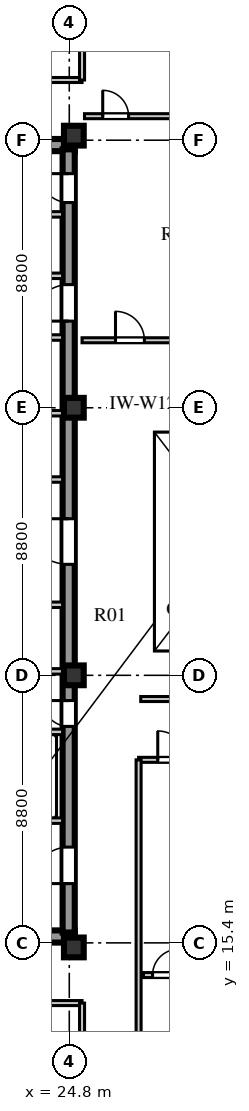
"""IFC4 building model, lengths in metres.
Left out: names, types, materials, properties, quantities, classifications, styles, units other than length and angle.
Written with IfcOpenShell. Run it as: python <this file> out.ifc"""

import sys

from ifc_helpers import new_model, si_unit, direction, frame, frame_2d, origin, origin_2d, place, context, subcontext, project, spatial, rectangle, extrude, element, fill, save


model = new_model("IFC4")
c1 = context("Model", 3, precision=1e-05, world=origin(), true_north=direction((0.0, 1.0)))
c2 = subcontext(c1, "Body", "Model", "MODEL_VIEW")
j1 = project(units=[si_unit("LENGTHUNIT", "METRE"), si_unit("PLANEANGLEUNIT", "RADIAN")], contexts=[c1])
p1 = place(None, origin())
s1 = spatial("IfcSite", under=j1, at=p1, CompositionType="ELEMENT")
p2 = place(p1, origin())
s2 = spatial("IfcBuilding", under=s1, at=p2, CompositionType="ELEMENT")
p3 = place(p2, frame((0.0, 0.0, 253.1)))
s3 = spatial("IfcBuildingStorey", under=s2, at=p3, CompositionType="ELEMENT", Elevation=253.1)
for number, where, z_axis, x_axis in (
    (1, (15.5, 15.61, 0.0), (0.0, 0.0, 1.0), (1.0, 0.0, 0.0)),
    (2, (15.5, 41.64, 0.0), (0.0, 0.0, 1.0), (1.0, 0.0, 0.0)),
):
    element("IfcWall", number, at=place(p3, frame(where, z_axis=z_axis, x_axis=x_axis)), inside=s3, PredefinedType="SHEAR", context=c2, shape_type="SweptSolid", body=[
        extrude(rectangle(XDim=9.48, YDim=0.4, at=frame_2d((4.74, 0.0))), origin(), (0.0, 0.0, 1.0), 3.66),
    ])
p4 = place(p3, frame((24.78, 15.74, 0.0), z_axis=(0.0, 0.0, 1.0), x_axis=(0.0, 1.0, 0.0)))
e3 = element("IfcWall", 3, at=p4, inside=s3, PredefinedType="SHEAR", context=c2, shape_type="SweptSolid", body=[
    extrude(rectangle(XDim=25.76, YDim=0.4, at=frame_2d((12.88, 0.0))), origin(), (0.0, 0.0, 1.0), 3.66),
])
p5 = place(p4, frame((1.61, 0.0, 0.0)))
e4 = element("IfcOpeningElement", 4, at=p5, cuts=e3, PredefinedType="OPENING", context=c2, shape_type="SweptSolid", body=[
    extrude(rectangle(XDim=1.2, YDim=2.1, at=frame_2d((0.6, 1.05))), frame((0.0, 0.21, 0.0), z_axis=(0.0, -1.0, 0.0), x_axis=(1.0, 0.0, 0.0)), (0.0, 0.0, 1.0), 0.42),
])
p6 = place(p4, frame((6.78, 0.0, 0.0)))
e5 = element("IfcOpeningElement", 5, at=p6, cuts=e3, PredefinedType="OPENING", context=c2, shape_type="SweptSolid", body=[
    extrude(rectangle(XDim=0.85, YDim=2.06, at=frame_2d((0.425, 1.03))), frame((0.0, 0.21, 0.0), z_axis=(0.0, -1.0, 0.0), x_axis=(1.0, 0.0, 0.0)), (0.0, 0.0, 1.0), 0.42),
])
p7 = place(p4, frame((12.11, 0.0, 0.0)))
e6 = element("IfcOpeningElement", 6, at=p7, cuts=e3, PredefinedType="OPENING", context=c2, shape_type="SweptSolid", body=[
    extrude(rectangle(XDim=1.5, YDim=2.12, at=frame_2d((0.75, 1.06))), frame((0.0, 0.21, 0.0), z_axis=(0.0, -1.0, 0.0), x_axis=(1.0, 0.0, 0.0)), (0.0, 0.0, 1.0), 0.42),
])
p8 = place(p4, frame((20.11, 0.0, 0.0)))
e7 = element("IfcOpeningElement", 7, at=p8, cuts=e3, PredefinedType="OPENING", context=c2, shape_type="SweptSolid", body=[
    extrude(rectangle(XDim=1.2, YDim=2.12, at=frame_2d((0.6, 1.06))), frame((0.0, 0.21, 0.0), z_axis=(0.0, -1.0, 0.0), x_axis=(1.0, 0.0, 0.0)), (0.0, 0.0, 1.0), 0.42),
])
p9 = place(p4, frame((24.01, 0.0, 0.0)))
e8 = element("IfcOpeningElement", 8, at=p9, cuts=e3, PredefinedType="OPENING", context=c2, shape_type="SweptSolid", body=[
    extrude(rectangle(XDim=0.95, YDim=2.1, at=frame_2d((0.475, 1.05))), frame((0.0, 0.21, 0.0), z_axis=(0.0, -1.0, 0.0), x_axis=(1.0, 0.0, 0.0)), (0.0, 0.0, 1.0), 0.42),
])
for number, where, z_axis, x_axis in (
    (9, (24.95, 15.25, 0.0), (0.0, 0.0, 1.0), (1.0, 0.0, 0.0)),
    (10, (24.95, 24.2, 0.0), (0.0, 0.0, 1.0), (1.0, 0.0, 0.0)),
    (11, (24.95, 33.0, 0.0), (0.0, 0.0, 1.0), (1.0, 0.0, 0.0)),
    (12, (24.95, 41.95, 0.0), (0.0, 0.0, 1.0), (1.0, 0.0, 0.0)),
):
    element("IfcColumn", number, at=place(p3, frame(where, z_axis=z_axis, x_axis=x_axis)), inside=s3, PredefinedType="COLUMN", context=c2, shape_type="SweptSolid", body=[
        extrude(rectangle(XDim=0.65, YDim=0.65, at=origin_2d()), origin(), (0.0, 0.0, 1.0), 3.66),
    ])
p10 = place(p3, frame((19.64, 19.42, 0.0), z_axis=(0.0, 0.0, 1.0), x_axis=(1.0, 0.0, 0.0)))
e13 = element("IfcWall", 13, at=p10, inside=s3, PredefinedType="SOLIDWALL", context=c2, shape_type="SweptSolid", body=[
    extrude(rectangle(XDim=4.94, YDim=0.18, at=frame_2d((2.47, 0.0))), origin(), (0.0, 0.0, 1.0), 3.66),
])
p11 = place(p10, frame((0.72, 0.0, 0.0)))
e14 = element("IfcOpeningElement", 14, at=p11, cuts=e13, PredefinedType="OPENING", context=c2, shape_type="SweptSolid", body=[
    extrude(rectangle(XDim=1.1, YDim=2.1, at=frame_2d((0.55, 1.05))), frame((0.0, 0.1, 0.0), z_axis=(0.0, -1.0, 0.0), x_axis=(1.0, 0.0, 0.0)), (0.0, 0.0, 1.0), 0.2),
])
p12 = place(p10, frame((3.02, 0.0, 0.0)))
e15 = element("IfcOpeningElement", 15, at=p12, cuts=e13, PredefinedType="OPENING", context=c2, shape_type="SweptSolid", body=[
    extrude(rectangle(XDim=1.1, YDim=2.1, at=frame_2d((0.55, 1.05))), frame((0.0, 0.1, 0.0), z_axis=(0.0, -1.0, 0.0), x_axis=(1.0, 0.0, 0.0)), (0.0, 0.0, 1.0), 0.2),
])
p13 = place(p3, frame((19.64, 22.34, 0.0), z_axis=(0.0, 0.0, 1.0), x_axis=(1.0, 0.0, 0.0)))
e16 = element("IfcWall", 16, at=p13, inside=s3, PredefinedType="SOLIDWALL", context=c2, shape_type="SweptSolid", body=[
    extrude(rectangle(XDim=4.94, YDim=0.18, at=frame_2d((2.47, 0.0))), origin(), (0.0, 0.0, 1.0), 3.66),
])
p14 = place(p3, frame((15.9, 26.52, 0.0), z_axis=(0.0, 0.0, 1.0), x_axis=(1.0, 0.0, 0.0)))
e17 = element("IfcWall", 17, at=p14, inside=s3, PredefinedType="SOLIDWALL", context=c2, shape_type="SweptSolid", body=[
    extrude(rectangle(XDim=8.68, YDim=0.18, at=frame_2d((4.34, 0.0))), origin(), (0.0, 0.0, 1.0), 3.66),
])
p15 = place(p14, frame((2.05, 0.0, 0.0)))
e18 = element("IfcOpeningElement", 18, at=p15, cuts=e17, PredefinedType="OPENING", context=c2, shape_type="SweptSolid", body=[
    extrude(rectangle(XDim=0.85, YDim=2.06, at=frame_2d((0.425, 1.03))), frame((0.0, 0.1, 0.0), z_axis=(0.0, -1.0, 0.0), x_axis=(1.0, 0.0, 0.0)), (0.0, 0.0, 1.0), 0.2),
])
p16 = place(p14, frame((5.2, 0.0, 0.0)))
e19 = element("IfcOpeningElement", 19, at=p16, cuts=e17, PredefinedType="OPENING", context=c2, shape_type="SweptSolid", body=[
    extrude(rectangle(XDim=0.95, YDim=2.1, at=frame_2d((0.475, 1.05))), frame((0.0, 0.1, 0.0), z_axis=(0.0, -1.0, 0.0), x_axis=(1.0, 0.0, 0.0)), (0.0, 0.0, 1.0), 0.2),
])
p17 = place(p3, frame((15.9, 24.33, 0.0), z_axis=(0.0, 0.0, 1.0), x_axis=(1.0, 0.0, 0.0)))
e20 = element("IfcWall", 20, at=p17, inside=s3, PredefinedType="SOLIDWALL", context=c2, shape_type="SweptSolid", body=[
    extrude(rectangle(XDim=8.68, YDim=0.18, at=frame_2d((4.34, 0.0))), origin(), (0.0, 0.0, 1.0), 3.06),
])
p18 = place(p3, frame((15.9, 30.64, 0.0), z_axis=(0.0, 0.0, 1.0), x_axis=(1.0, 0.0, 0.0)))
e21 = element("IfcWall", 21, at=p18, inside=s3, PredefinedType="SOLIDWALL", context=c2, shape_type="SweptSolid", body=[
    extrude(rectangle(XDim=8.68, YDim=0.18, at=frame_2d((4.34, 0.0))), origin(), (0.0, 0.0, 1.0), 3.66),
])
p19 = place(p18, frame((3.7, 0.0, 0.0)))
e22 = element("IfcOpeningElement", 22, at=p19, cuts=e21, PredefinedType="OPENING", context=c2, shape_type="SweptSolid", body=[
    extrude(rectangle(XDim=0.95, YDim=2.1, at=frame_2d((0.475, 1.05))), frame((0.0, 0.1, 0.0), z_axis=(0.0, -1.0, 0.0), x_axis=(1.0, 0.0, 0.0)), (0.0, 0.0, 1.0), 0.2),
])
p20 = place(p3, frame((15.9, 32.82, 0.0), z_axis=(0.0, 0.0, 1.0), x_axis=(1.0, 0.0, 0.0)))
e23 = element("IfcWall", 23, at=p20, inside=s3, PredefinedType="SOLIDWALL", context=c2, shape_type="SweptSolid", body=[
    extrude(rectangle(XDim=8.68, YDim=0.18, at=frame_2d((4.34, 0.0))), origin(), (0.0, 0.0, 1.0), 3.06),
])
p21 = place(p3, frame((22.02, 35.31, 0.0), z_axis=(0.0, 0.0, 1.0), x_axis=(1.0, 0.0, 0.0)))
e24 = element("IfcWall", 24, at=p21, inside=s3, PredefinedType="SOLIDWALL", context=c2, shape_type="SweptSolid", body=[
    extrude(rectangle(XDim=2.56, YDim=0.18, at=frame_2d((1.28, 0.0))), origin(), (0.0, 0.0, 1.0), 3.66),
])
p22 = place(p21, frame((0.55, 0.0, 0.0)))
e25 = element("IfcOpeningElement", 25, at=p22, cuts=e24, PredefinedType="OPENING", context=c2, shape_type="SweptSolid", body=[
    extrude(rectangle(XDim=1.0, YDim=2.1, at=frame_2d((0.5, 1.05))), frame((0.0, 0.1, 0.0), z_axis=(0.0, -1.0, 0.0), x_axis=(1.0, 0.0, 0.0)), (0.0, 0.0, 1.0), 0.2),
])
p23 = place(p3, frame((19.64, 37.34, 0.0), z_axis=(0.0, 0.0, 1.0), x_axis=(1.0, 0.0, 0.0)))
e26 = element("IfcWall", 26, at=p23, inside=s3, PredefinedType="SOLIDWALL", context=c2, shape_type="SweptSolid", body=[
    extrude(rectangle(XDim=4.94, YDim=0.18, at=frame_2d((2.47, 0.0))), origin(), (0.0, 0.0, 1.0), 3.66),
])
p24 = place(p23, frame((0.45, 0.0, 0.0)))
e27 = element("IfcOpeningElement", 27, at=p24, cuts=e26, PredefinedType="OPENING", context=c2, shape_type="SweptSolid", body=[
    extrude(rectangle(XDim=1.0, YDim=2.1, at=frame_2d((0.5, 1.05))), frame((0.0, 0.1, 0.0), z_axis=(0.0, -1.0, 0.0), x_axis=(1.0, 0.0, 0.0)), (0.0, 0.0, 1.0), 0.2),
])
p25 = place(p23, frame((2.5, 0.0, 0.0)))
e28 = element("IfcOpeningElement", 28, at=p25, cuts=e26, PredefinedType="OPENING", context=c2, shape_type="SweptSolid", body=[
    extrude(rectangle(XDim=1.0, YDim=2.1, at=frame_2d((0.5, 1.05))), frame((0.0, 0.1, 0.0), z_axis=(0.0, -1.0, 0.0), x_axis=(1.0, 0.0, 0.0)), (0.0, 0.0, 1.0), 0.2),
])
p26 = place(p3, frame((19.64, 39.36, 0.0), z_axis=(0.0, 0.0, 1.0), x_axis=(1.0, 0.0, 0.0)))
e29 = element("IfcWall", 29, at=p26, inside=s3, PredefinedType="SOLIDWALL", context=c2, shape_type="SweptSolid", body=[
    extrude(rectangle(XDim=4.94, YDim=0.18, at=frame_2d((2.47, 0.0))), origin(), (0.0, 0.0, 1.0), 3.66),
])
p27 = place(p3, frame((27.08, 21.42, 0.0), z_axis=(0.0, 0.0, 1.0), x_axis=(1.0, 0.0, 0.0)))
e30 = element("IfcWall", 30, at=p27, inside=s3, PredefinedType="PARTITIONING", context=c2, shape_type="SweptSolid", body=[
    extrude(rectangle(XDim=12.07, YDim=0.165, at=frame_2d((6.035, 0.0))), origin(), (0.0, 0.0, 1.0), 3.31),
])
p28 = place(p27, frame((0.63, 0.0, 0.0)))
e31 = element("IfcOpeningElement", 31, at=p28, cuts=e30, PredefinedType="OPENING", context=c2, shape_type="SweptSolid", body=[
    extrude(rectangle(XDim=0.95, YDim=2.1, at=frame_2d((0.475, 1.05))), frame((0.0, 0.093, 0.0), z_axis=(0.0, -1.0, 0.0), x_axis=(1.0, 0.0, 0.0)), (0.0, 0.0, 1.0), 0.185),
])
p29 = place(p3, frame((27.08, 7.88, 0.0), z_axis=(0.0, 0.0, 1.0), x_axis=(0.0, 1.0, 0.0)))
e32 = element("IfcWall", 32, at=p29, inside=s3, PredefinedType="PARTITIONING", context=c2, shape_type="SweptSolid", body=[
    extrude(rectangle(XDim=13.54, YDim=0.165, at=frame_2d((6.77, 0.0))), origin(), (0.0, 0.0, 1.0), 3.66),
])
p30 = place(p3, frame((27.15, 23.42, 0.0), z_axis=(0.0, 0.0, 1.0), x_axis=(1.0, 0.0, 0.0)))
e33 = element("IfcWall", 33, at=p30, inside=s3, PredefinedType="PARTITIONING", context=c2, shape_type="SweptSolid", body=[
    extrude(rectangle(XDim=6.0, YDim=0.165, at=frame_2d((3.0, 0.0))), origin(), (0.0, 0.0, 1.0), 3.66),
])
p31 = place(p3, frame((25.22, 35.22, 0.0), z_axis=(0.0, 0.0, 1.0), x_axis=(1.0, 0.0, 0.0)))
e34 = element("IfcWall", 34, at=p31, inside=s3, PredefinedType="PARTITIONING", context=c2, shape_type="SweptSolid", body=[
    extrude(rectangle(XDim=9.5, YDim=0.165, at=frame_2d((4.75, 0.0))), origin(), (0.0, 0.0, 1.0), 3.66),
])
p32 = place(p31, frame((1.1, 0.0, 0.0)))
e35 = element("IfcOpeningElement", 35, at=p32, cuts=e34, PredefinedType="OPENING", context=c2, shape_type="SweptSolid", body=[
    extrude(rectangle(XDim=0.95, YDim=2.1, at=frame_2d((0.475, 1.05))), frame((0.0, 0.093, 0.0), z_axis=(0.0, -1.0, 0.0), x_axis=(1.0, 0.0, 0.0)), (0.0, 0.0, 1.0), 0.185),
])
p33 = place(p3, frame((13.4, 13.42, 0.0), z_axis=(0.0, 0.0, 1.0), x_axis=(1.0, 0.0, 0.0)))
e36 = element("IfcWall", 36, at=p33, inside=s3, PredefinedType="PARTITIONING", context=c2, shape_type="SweptSolid", body=[
    extrude(rectangle(XDim=11.82, YDim=0.165, at=frame_2d((5.91, 0.0))), origin(), (0.0, 0.0, 1.0), 3.66),
])
p34 = place(p33, frame((0.15, 0.0, 0.0)))
e37 = element("IfcOpeningElement", 37, at=p34, cuts=e36, PredefinedType="OPENING", context=c2, shape_type="SweptSolid", body=[
    extrude(rectangle(XDim=0.9, YDim=2.08, at=frame_2d((0.45, 1.04))), frame((0.0, 0.093, 0.0), z_axis=(0.0, -1.0, 0.0), x_axis=(1.0, 0.0, 0.0)), (0.0, 0.0, 1.0), 0.185),
])
p35 = place(p33, frame((6.87, 0.0, 0.0)))
e38 = element("IfcOpeningElement", 38, at=p35, cuts=e36, PredefinedType="OPENING", context=c2, shape_type="SweptSolid", body=[
    extrude(rectangle(XDim=0.9, YDim=2.08, at=frame_2d((0.45, 1.04))), frame((0.0, 0.093, 0.0), z_axis=(0.0, -1.0, 0.0), x_axis=(1.0, 0.0, 0.0)), (0.0, 0.0, 1.0), 0.185),
])
p36 = place(p3, frame((25.22, 7.88, 0.0), z_axis=(0.0, 0.0, 1.0), x_axis=(0.0, 1.0, 0.0)))
e39 = element("IfcWall", 39, at=p36, inside=s3, PredefinedType="PARTITIONING", context=c2, shape_type="SweptSolid", body=[
    extrude(rectangle(XDim=5.54, YDim=0.165, at=frame_2d((2.77, 0.0))), origin(), (0.0, 0.0, 1.0), 3.21),
])
p37 = place(p3, frame((13.4, 43.78, 0.0), z_axis=(0.0, 0.0, 1.0), x_axis=(1.0, 0.0, 0.0)))
e40 = element("IfcWall", 40, at=p37, inside=s3, PredefinedType="PARTITIONING", context=c2, shape_type="SweptSolid", body=[
    extrude(rectangle(XDim=11.82, YDim=0.165, at=frame_2d((5.91, 0.0))), origin(), (0.0, 0.0, 1.0), 3.66),
])
p38 = place(p37, frame((3.2, 0.0, 0.0)))
e41 = element("IfcOpeningElement", 41, at=p38, cuts=e40, PredefinedType="OPENING", context=c2, shape_type="SweptSolid", body=[
    extrude(rectangle(XDim=0.95, YDim=2.08, at=frame_2d((0.475, 1.04))), frame((0.0, 0.093, 0.0), z_axis=(0.0, -1.0, 0.0), x_axis=(1.0, 0.0, 0.0)), (0.0, 0.0, 1.0), 0.185),
])
p39 = place(p3, frame((25.22, 43.78, 0.0), z_axis=(0.0, 0.0, 1.0), x_axis=(0.0, 1.0, 0.0)))
e42 = element("IfcWall", 42, at=p39, inside=s3, PredefinedType="PARTITIONING", context=c2, shape_type="SweptSolid", body=[
    extrude(rectangle(XDim=5.54, YDim=0.165, at=frame_2d((2.77, 0.0))), origin(), (0.0, 0.0, 1.0), 3.21),
])
p40 = place(p3, frame((27.24, 14.341, 0.0), z_axis=(0.0, 0.0, 1.0), x_axis=(1.0, 0.0, 0.0)))
e43 = element("IfcWall", 43, at=p40, inside=s3, PredefinedType="PARTITIONING", context=c2, shape_type="SweptSolid", body=[
    extrude(rectangle(XDim=11.83, YDim=0.165, at=frame_2d((5.915, 0.0))), origin(), (0.0, 0.0, 1.0), 3.66),
])
p41 = place(p40, frame((0.3, 0.0, 0.0)))
e44 = element("IfcOpeningElement", 44, at=p41, cuts=e43, PredefinedType="OPENING", context=c2, shape_type="SweptSolid", body=[
    extrude(rectangle(XDim=0.85, YDim=2.08, at=frame_2d((0.425, 1.04))), frame((0.0, 0.093, 0.0), z_axis=(0.0, -1.0, 0.0), x_axis=(1.0, 0.0, 0.0)), (0.0, 0.0, 1.0), 0.185),
])
p42 = place(p40, frame((3.135, 0.0, 0.0)))
e45 = element("IfcOpeningElement", 45, at=p42, cuts=e43, PredefinedType="OPENING", context=c2, shape_type="SweptSolid", body=[
    extrude(rectangle(XDim=0.85, YDim=2.08, at=frame_2d((0.425, 1.04))), frame((0.0, 0.093, 0.0), z_axis=(0.0, -1.0, 0.0), x_axis=(1.0, 0.0, 0.0)), (0.0, 0.0, 1.0), 0.185),
])
p43 = place(p3, frame((25.3, 42.59, 0.0), z_axis=(0.0, 0.0, 1.0), x_axis=(1.0, 0.0, 0.0)))
e46 = element("IfcWall", 46, at=p43, inside=s3, PredefinedType="PARTITIONING", context=c2, shape_type="SweptSolid", body=[
    extrude(rectangle(XDim=9.34, YDim=0.165, at=frame_2d((4.67, 0.0))), origin(), (0.0, 0.0, 1.0), 3.66),
])
p44 = place(p43, frame((0.6, 0.0, 0.0)))
e47 = element("IfcOpeningElement", 47, at=p44, cuts=e46, PredefinedType="OPENING", context=c2, shape_type="SweptSolid", body=[
    extrude(rectangle(XDim=0.85, YDim=2.08, at=frame_2d((0.425, 1.04))), frame((0.0, 0.093, 0.0), z_axis=(0.0, -1.0, 0.0), x_axis=(1.0, 0.0, 0.0)), (0.0, 0.0, 1.0), 0.185),
])
p45 = place(p43, frame((3.573, 0.0, 0.0)))
e48 = element("IfcOpeningElement", 48, at=p45, cuts=e46, PredefinedType="OPENING", context=c2, shape_type="SweptSolid", body=[
    extrude(rectangle(XDim=0.85, YDim=2.08, at=frame_2d((0.425, 1.04))), frame((0.0, 0.093, 0.0), z_axis=(0.0, -1.0, 0.0), x_axis=(1.0, 0.0, 0.0)), (0.0, 0.0, 1.0), 0.185),
])
p46 = place(p5, frame((1.2, 0.0, 0.0), z_axis=(0.0, 0.0, 1.0), x_axis=(-1.0, 0.0, 0.0)))
e49 = element("IfcDoor", 49, at=p46, inside=s3, OperationType="SINGLE_SWING_RIGHT", PredefinedType="DOOR", context=c2, shape_type="SweptSolid", body=[
    extrude(rectangle(XDim=1.2, YDim=2.1, at=frame_2d((0.6, 1.05))), frame((0.0, 0.025, 0.0), z_axis=(0.0, -1.0, 0.0), x_axis=(1.0, 0.0, 0.0)), (0.0, 0.0, 1.0), 0.05),
])
fill(e4, e49)
p47 = place(p6, frame((0.85, 0.0, 0.0), z_axis=(0.0, 0.0, 1.0), x_axis=(-1.0, 0.0, 0.0)))
e50 = element("IfcDoor", 50, at=p47, inside=s3, OperationType="SINGLE_SWING_LEFT", PredefinedType="DOOR", context=c2, shape_type="SweptSolid", body=[
    extrude(rectangle(XDim=0.85, YDim=2.06, at=frame_2d((0.425, 1.03))), frame((0.0, 0.025, 0.0), z_axis=(0.0, -1.0, 0.0), x_axis=(1.0, 0.0, 0.0)), (0.0, 0.0, 1.0), 0.05),
])
fill(e5, e50)
p48 = place(p7, frame((1.5, 0.0, 0.0), z_axis=(0.0, 0.0, 1.0), x_axis=(-1.0, 0.0, 0.0)))
e51 = element("IfcDoor", 51, at=p48, inside=s3, OperationType="SINGLE_SWING_LEFT", PredefinedType="DOOR", context=c2, shape_type="SweptSolid", body=[
    extrude(rectangle(XDim=1.5, YDim=2.12, at=frame_2d((0.75, 1.06))), frame((0.0, 0.025, 0.0), z_axis=(0.0, -1.0, 0.0), x_axis=(1.0, 0.0, 0.0)), (0.0, 0.0, 1.0), 0.05),
])
fill(e6, e51)
p49 = place(p8, frame((1.2, 0.0, 0.0), z_axis=(0.0, 0.0, 1.0), x_axis=(-1.0, 0.0, 0.0)))
e52 = element("IfcDoor", 52, at=p49, inside=s3, OperationType="SINGLE_SWING_RIGHT", PredefinedType="DOOR", context=c2, shape_type="SweptSolid", body=[
    extrude(rectangle(XDim=1.2, YDim=2.12, at=frame_2d((0.6, 1.06))), frame((0.0, 0.025, 0.0), z_axis=(0.0, -1.0, 0.0), x_axis=(1.0, 0.0, 0.0)), (0.0, 0.0, 1.0), 0.05),
])
fill(e7, e52)
p50 = place(p9, frame((0.95, 0.0, 0.0), z_axis=(0.0, 0.0, 1.0), x_axis=(-1.0, 0.0, 0.0)))
e53 = element("IfcDoor", 53, at=p50, inside=s3, OperationType="SINGLE_SWING_LEFT", PredefinedType="DOOR", context=c2, shape_type="SweptSolid", body=[
    extrude(rectangle(XDim=0.95, YDim=2.1, at=frame_2d((0.475, 1.05))), frame((0.0, 0.025, 0.0), z_axis=(0.0, -1.0, 0.0), x_axis=(1.0, 0.0, 0.0)), (0.0, 0.0, 1.0), 0.05),
])
fill(e8, e53)
p51 = place(p41, frame((0.85, 0.0, 0.0), z_axis=(0.0, 0.0, 1.0), x_axis=(-1.0, 0.0, 0.0)))
e54 = element("IfcDoor", 54, at=p51, inside=s3, OperationType="SINGLE_SWING_LEFT", PredefinedType="DOOR", context=c2, shape_type="SweptSolid", body=[
    extrude(rectangle(XDim=0.85, YDim=2.08, at=frame_2d((0.425, 1.04))), frame((0.0, 0.025, 0.0), z_axis=(0.0, -1.0, 0.0), x_axis=(1.0, 0.0, 0.0)), (0.0, 0.0, 1.0), 0.05),
])
fill(e44, e54)
p52 = place(p28, frame((0.95, 0.0, 0.0), z_axis=(0.0, 0.0, 1.0), x_axis=(-1.0, 0.0, 0.0)))
e55 = element("IfcDoor", 55, at=p52, inside=s3, OperationType="SINGLE_SWING_RIGHT", PredefinedType="DOOR", context=c2, shape_type="SweptSolid", body=[
    extrude(rectangle(XDim=0.95, YDim=2.1, at=frame_2d((0.475, 1.05))), frame((0.0, 0.025, 0.0), z_axis=(0.0, -1.0, 0.0), x_axis=(1.0, 0.0, 0.0)), (0.0, 0.0, 1.0), 0.05),
])
fill(e31, e55)
p53 = place(p44, origin())
e56 = element("IfcDoor", 56, at=p53, inside=s3, OperationType="SINGLE_SWING_LEFT", PredefinedType="DOOR", context=c2, shape_type="SweptSolid", body=[
    extrude(rectangle(XDim=0.85, YDim=2.08, at=frame_2d((0.425, 1.04))), frame((0.0, 0.025, 0.0), z_axis=(0.0, -1.0, 0.0), x_axis=(1.0, 0.0, 0.0)), (0.0, 0.0, 1.0), 0.05),
])
fill(e47, e56)
p54 = place(p32, origin())
e57 = element("IfcDoor", 57, at=p54, inside=s3, OperationType="SINGLE_SWING_LEFT", PredefinedType="DOOR", context=c2, shape_type="SweptSolid", body=[
    extrude(rectangle(XDim=0.95, YDim=2.1, at=frame_2d((0.475, 1.05))), frame((0.0, 0.025, 0.0), z_axis=(0.0, -1.0, 0.0), x_axis=(1.0, 0.0, 0.0)), (0.0, 0.0, 1.0), 0.05),
])
fill(e35, e57)
save(model, sys.argv[1])
